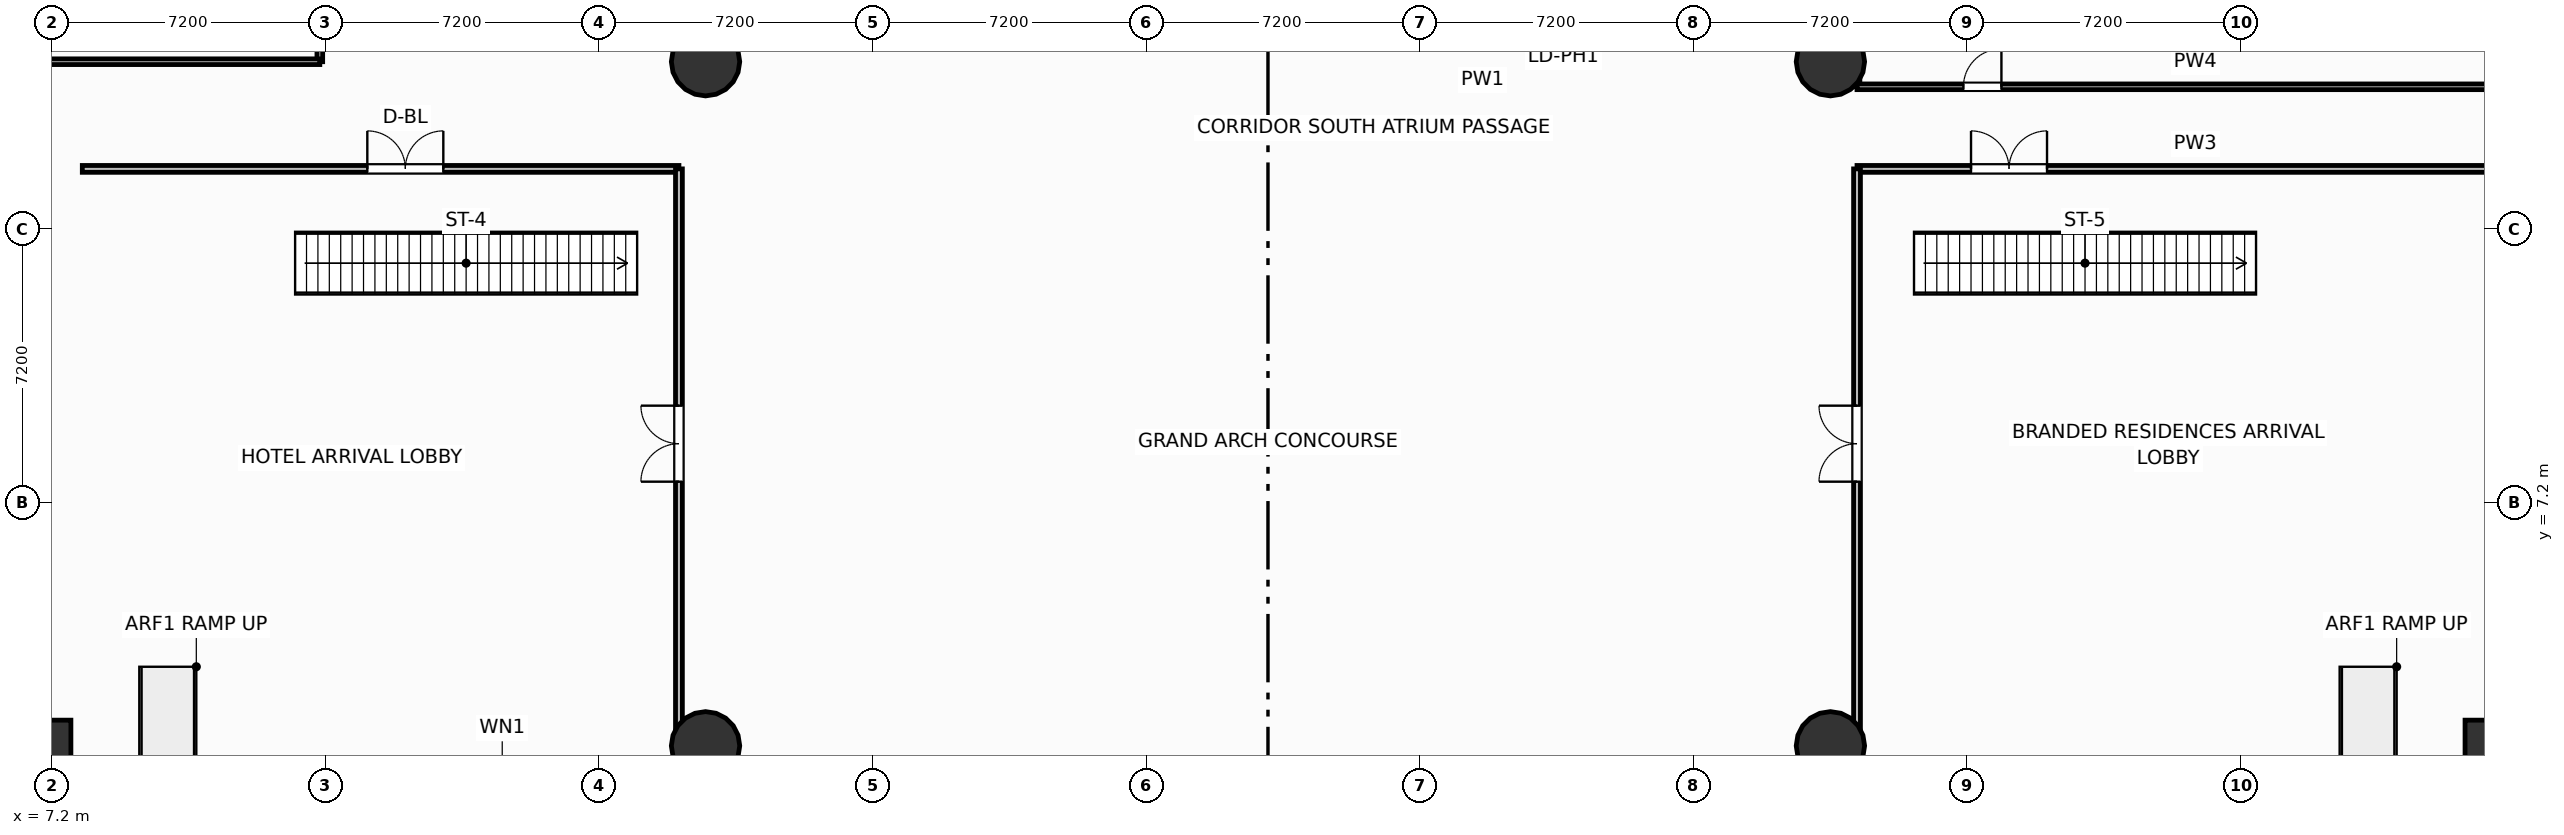
"""IFC4 building model, lengths in metres.
Left out: names, types, materials, properties, quantities, classifications, styles, units other than length and angle.
Written with IfcOpenShell. Run it as: python <this file> out.ifc"""

import sys

from ifc_helpers import new_model, si_unit, direction, frame, frame_2d, origin, origin_2d, place, context, subcontext, project, spatial, rectangle, circle, extrude, element, fill, save


model = new_model("IFC4")
c1 = context("Model", 3, precision=1e-05, world=origin(), true_north=direction((0.0, 1.0)))
c2 = subcontext(c1, "Body", "Model", "MODEL_VIEW")
j1 = project(units=[si_unit("LENGTHUNIT", "METRE"), si_unit("PLANEANGLEUNIT", "RADIAN")], contexts=[c1])
p1 = place(None, origin())
s1 = spatial("IfcSite", under=j1, at=p1, CompositionType="ELEMENT")
p2 = place(p1, origin())
s2 = spatial("IfcBuilding", under=s1, at=p2, CompositionType="ELEMENT")
p3 = place(p2, origin())
s3 = spatial("IfcBuildingStorey", under=s2, at=p3, CompositionType="ELEMENT", Elevation=0.0)
p4 = place(p3, frame((7.2, 0.8, 0.0), z_axis=(0.0, 0.0, 1.0), x_axis=(1.0, 0.0, 0.0)))
e1 = element("IfcColumn", 1, at=p4, inside=s3, PredefinedType="COLUMN", context=c2, shape_type="SweptSolid", body=[
    extrude(rectangle(XDim=1.0, YDim=1.35, at=origin_2d()), origin(), (0.0, 0.0, 1.0), 5.4),
])
for number, where, z_axis, x_axis in (
    (2, (24.4, 0.8, 0.0), (0.0, 0.0, 1.0), (1.0, 0.0, 0.0)),
    (3, (54.0, 0.8, 0.0), (0.0, 0.0, 1.0), (1.0, 0.0, 0.0)),
):
    element("IfcColumn", number, at=place(p3, frame(where, z_axis=z_axis, x_axis=x_axis)), inside=s3, PredefinedType="COLUMN", context=c2, shape_type="SweptSolid", body=[
        extrude(circle(Radius=0.9, at=origin_2d()), origin(), (0.0, 0.0, 1.0), 5.4),
    ])
p5 = place(p3, frame((71.2, 0.8, 0.0), z_axis=(0.0, 0.0, 1.0), x_axis=(1.0, 0.0, 0.0)))
e4 = element("IfcColumn", 4, at=p5, inside=s3, PredefinedType="COLUMN", context=c2, shape_type="SweptSolid", body=[
    extrude(rectangle(XDim=1.0, YDim=1.35, at=origin_2d()), origin(), (0.0, 0.0, 1.0), 5.4),
])
for number, where, z_axis, x_axis in (
    (5, (24.4, 18.8, 0.0), (0.0, 0.0, 1.0), (1.0, 0.0, 0.0)),
    (6, (54.0, 18.8, 0.0), (0.0, 0.0, 1.0), (1.0, 0.0, 0.0)),
):
    element("IfcColumn", number, at=place(p3, frame(where, z_axis=z_axis, x_axis=x_axis)), inside=s3, PredefinedType="COLUMN", context=c2, shape_type="SweptSolid", body=[
        extrude(circle(Radius=0.9, at=origin_2d()), origin(), (0.0, 0.0, 1.0), 5.4),
    ])
p6 = place(p3, frame((8.0, 15.98, 0.0), z_axis=(0.0, 0.0, 1.0), x_axis=(1.0, 0.0, 0.0)))
e7 = element("IfcWall", 7, at=p6, inside=s3, PredefinedType="PARTITIONING", context=c2, shape_type="SweptSolid", body=[
    extrude(rectangle(XDim=15.7, YDim=0.18, at=frame_2d((7.85, 0.0))), origin(), (0.0, 0.0, 1.0), 4.085),
])
p7 = place(p6, frame((7.5, 0.0, 0.0)))
e8 = element("IfcOpeningElement", 8, at=p7, cuts=e7, PredefinedType="OPENING", context=c2, shape_type="SweptSolid", body=[
    extrude(rectangle(XDim=2.0, YDim=2.05, at=frame_2d((1.0, 1.025))), frame((0.0, 0.1, 0.0), z_axis=(0.0, -1.0, 0.0), x_axis=(1.0, 0.0, 0.0)), (0.0, 0.0, 1.0), 0.2),
])
p8 = place(p3, frame((54.7, 15.98, 0.0), z_axis=(0.0, 0.0, 1.0), x_axis=(1.0, 0.0, 0.0)))
e9 = element("IfcWall", 9, at=p8, inside=s3, PredefinedType="PARTITIONING", context=c2, shape_type="SweptSolid", body=[
    extrude(rectangle(XDim=17.8, YDim=0.18, at=frame_2d((8.9, 0.0))), origin(), (0.0, 0.0, 1.0), 4.085),
])
p9 = place(p8, frame((3.0, 0.0, 0.0)))
e10 = element("IfcOpeningElement", 10, at=p9, cuts=e9, PredefinedType="OPENING", context=c2, shape_type="SweptSolid", body=[
    extrude(rectangle(XDim=2.0, YDim=2.05, at=frame_2d((1.0, 1.025))), frame((0.0, 0.1, 0.0), z_axis=(0.0, -1.0, 0.0), x_axis=(1.0, 0.0, 0.0)), (0.0, 0.0, 1.0), 0.2),
])
p10 = place(p3, frame((23.7, 0.25, 0.0), z_axis=(0.0, 0.0, 1.0), x_axis=(0.0, 1.0, 0.0)))
e11 = element("IfcWall", 11, at=p10, inside=s3, PredefinedType="PARTITIONING", context=c2, shape_type="SweptSolid", body=[
    extrude(rectangle(XDim=15.73, YDim=0.18, at=frame_2d((7.865, 0.0))), origin(), (0.0, 0.0, 1.0), 5.12),
])
p11 = place(p10, frame((7.5, 0.0, 0.0)))
e12 = element("IfcOpeningElement", 12, at=p11, cuts=e11, PredefinedType="OPENING", context=c2, shape_type="SweptSolid", body=[
    extrude(rectangle(XDim=2.0, YDim=2.05, at=frame_2d((1.0, 1.025))), frame((0.0, 0.1, 0.0), z_axis=(0.0, -1.0, 0.0), x_axis=(1.0, 0.0, 0.0)), (0.0, 0.0, 1.0), 0.2),
])
p12 = place(p3, frame((54.7, 0.25, 0.0), z_axis=(0.0, 0.0, 1.0), x_axis=(0.0, 1.0, 0.0)))
e13 = element("IfcWall", 13, at=p12, inside=s3, PredefinedType="PARTITIONING", context=c2, shape_type="SweptSolid", body=[
    extrude(rectangle(XDim=15.73, YDim=0.18, at=frame_2d((7.865, 0.0))), origin(), (0.0, 0.0, 1.0), 5.12),
])
p13 = place(p12, frame((7.5, 0.0, 0.0)))
e14 = element("IfcOpeningElement", 14, at=p13, cuts=e13, PredefinedType="OPENING", context=c2, shape_type="SweptSolid", body=[
    extrude(rectangle(XDim=2.0, YDim=2.05, at=frame_2d((1.0, 1.025))), frame((0.0, 0.1, 0.0), z_axis=(0.0, -1.0, 0.0), x_axis=(1.0, 0.0, 0.0)), (0.0, 0.0, 1.0), 0.2),
])
p14 = place(p3, frame((14.25, 18.8, 0.0), z_axis=(0.0, 0.0, 1.0), x_axis=(0.0, 1.0, 0.0)))
e15 = element("IfcWall", 15, at=p14, inside=s3, PredefinedType="PARTITIONING", context=c2, shape_type="SweptSolid", body=[
    extrude(rectangle(XDim=16.65, YDim=0.15, at=frame_2d((8.325, 0.0))), origin(), (0.0, 0.0, 1.0), 5.12),
])
p15 = place(p14, frame((7.5, 0.0, 0.0)))
e16 = element("IfcOpeningElement", 16, at=p15, cuts=e15, PredefinedType="OPENING", context=c2, shape_type="SweptSolid", body=[
    extrude(rectangle(XDim=1.0, YDim=2.05, at=frame_2d((0.5, 1.025))), frame((0.0, 0.085, 0.0), z_axis=(0.0, -1.0, 0.0), x_axis=(1.0, 0.0, 0.0)), (0.0, 0.0, 1.0), 0.17),
])
p16 = place(p3, frame((0.2, 18.8, 0.0), z_axis=(0.0, 0.0, 1.0), x_axis=(1.0, 0.0, 0.0)))
e17 = element("IfcWall", 17, at=p16, inside=s3, PredefinedType="PARTITIONING", context=c2, shape_type="SweptSolid", body=[
    extrude(rectangle(XDim=14.05, YDim=0.15, at=frame_2d((7.025, 0.0))), origin(), (0.0, 0.0, 1.0), 5.12),
])
p17 = place(p3, frame((54.7, 18.14, 0.0), z_axis=(0.0, 0.0, 1.0), x_axis=(0.0, 1.0, 0.0)))
e18 = element("IfcWall", 18, at=p17, inside=s3, PredefinedType="PARTITIONING", context=c2, shape_type="SweptSolid", body=[
    extrude(rectangle(XDim=8.48, YDim=0.15, at=frame_2d((4.24, 0.0))), origin(), (0.0, 0.0, 1.0), 5.12),
])
p18 = place(p3, frame((54.7, 18.14, 0.0), z_axis=(0.0, 0.0, 1.0), x_axis=(1.0, 0.0, 0.0)))
e19 = element("IfcWall", 19, at=p18, inside=s3, PredefinedType="PARTITIONING", context=c2, shape_type="SweptSolid", body=[
    extrude(rectangle(XDim=17.8, YDim=0.15, at=frame_2d((8.9, 0.0))), origin(), (0.0, 0.0, 1.0), 4.085),
])
p19 = place(p18, frame((2.8, 0.0, 0.0)))
e20 = element("IfcOpeningElement", 20, at=p19, cuts=e19, PredefinedType="OPENING", context=c2, shape_type="SweptSolid", body=[
    extrude(rectangle(XDim=1.0, YDim=2.05, at=frame_2d((0.5, 1.025))), frame((0.0, 0.085, 0.0), z_axis=(0.0, -1.0, 0.0), x_axis=(1.0, 0.0, 0.0)), (0.0, 0.0, 1.0), 0.17),
])
p20 = place(p7, origin())
e21 = element("IfcDoor", 21, at=p20, inside=s3, OperationType="DOUBLE_DOOR_SINGLE_SWING", PredefinedType="DOOR", context=c2, shape_type="SweptSolid", body=[
    extrude(rectangle(XDim=2.0, YDim=2.05, at=frame_2d((1.0, 1.025))), frame((0.0, 0.025, 0.0), z_axis=(0.0, -1.0, 0.0), x_axis=(1.0, 0.0, 0.0)), (0.0, 0.0, 1.0), 0.05),
])
fill(e8, e21)
p21 = place(p9, origin())
e22 = element("IfcDoor", 22, at=p21, inside=s3, OperationType="DOUBLE_DOOR_SINGLE_SWING", PredefinedType="DOOR", context=c2, shape_type="SweptSolid", body=[
    extrude(rectangle(XDim=2.0, YDim=2.05, at=frame_2d((1.0, 1.025))), frame((0.0, 0.025, 0.0), z_axis=(0.0, -1.0, 0.0), x_axis=(1.0, 0.0, 0.0)), (0.0, 0.0, 1.0), 0.05),
])
fill(e10, e22)
p22 = place(p11, origin())
e23 = element("IfcDoor", 23, at=p22, inside=s3, OperationType="DOUBLE_DOOR_SINGLE_SWING", PredefinedType="DOOR", context=c2, shape_type="SweptSolid", body=[
    extrude(rectangle(XDim=2.0, YDim=2.05, at=frame_2d((1.0, 1.025))), frame((0.0, 0.025, 0.0), z_axis=(0.0, -1.0, 0.0), x_axis=(1.0, 0.0, 0.0)), (0.0, 0.0, 1.0), 0.05),
])
fill(e12, e23)
p23 = place(p13, origin())
e24 = element("IfcDoor", 24, at=p23, inside=s3, OperationType="DOUBLE_DOOR_SINGLE_SWING", PredefinedType="DOOR", context=c2, shape_type="SweptSolid", body=[
    extrude(rectangle(XDim=2.0, YDim=2.05, at=frame_2d((1.0, 1.025))), frame((0.0, 0.025, 0.0), z_axis=(0.0, -1.0, 0.0), x_axis=(1.0, 0.0, 0.0)), (0.0, 0.0, 1.0), 0.05),
])
fill(e14, e24)
p24 = place(p19, origin())
e25 = element("IfcDoor", 25, at=p24, inside=s3, OperationType="SINGLE_SWING_RIGHT", PredefinedType="DOOR", context=c2, shape_type="SweptSolid", body=[
    extrude(rectangle(XDim=1.0, YDim=2.05, at=frame_2d((0.5, 1.025))), frame((0.0, 0.025, 0.0), z_axis=(0.0, -1.0, 0.0), x_axis=(1.0, 0.0, 0.0)), (0.0, 0.0, 1.0), 0.05),
])
fill(e20, e25)
save(model, sys.argv[1])
